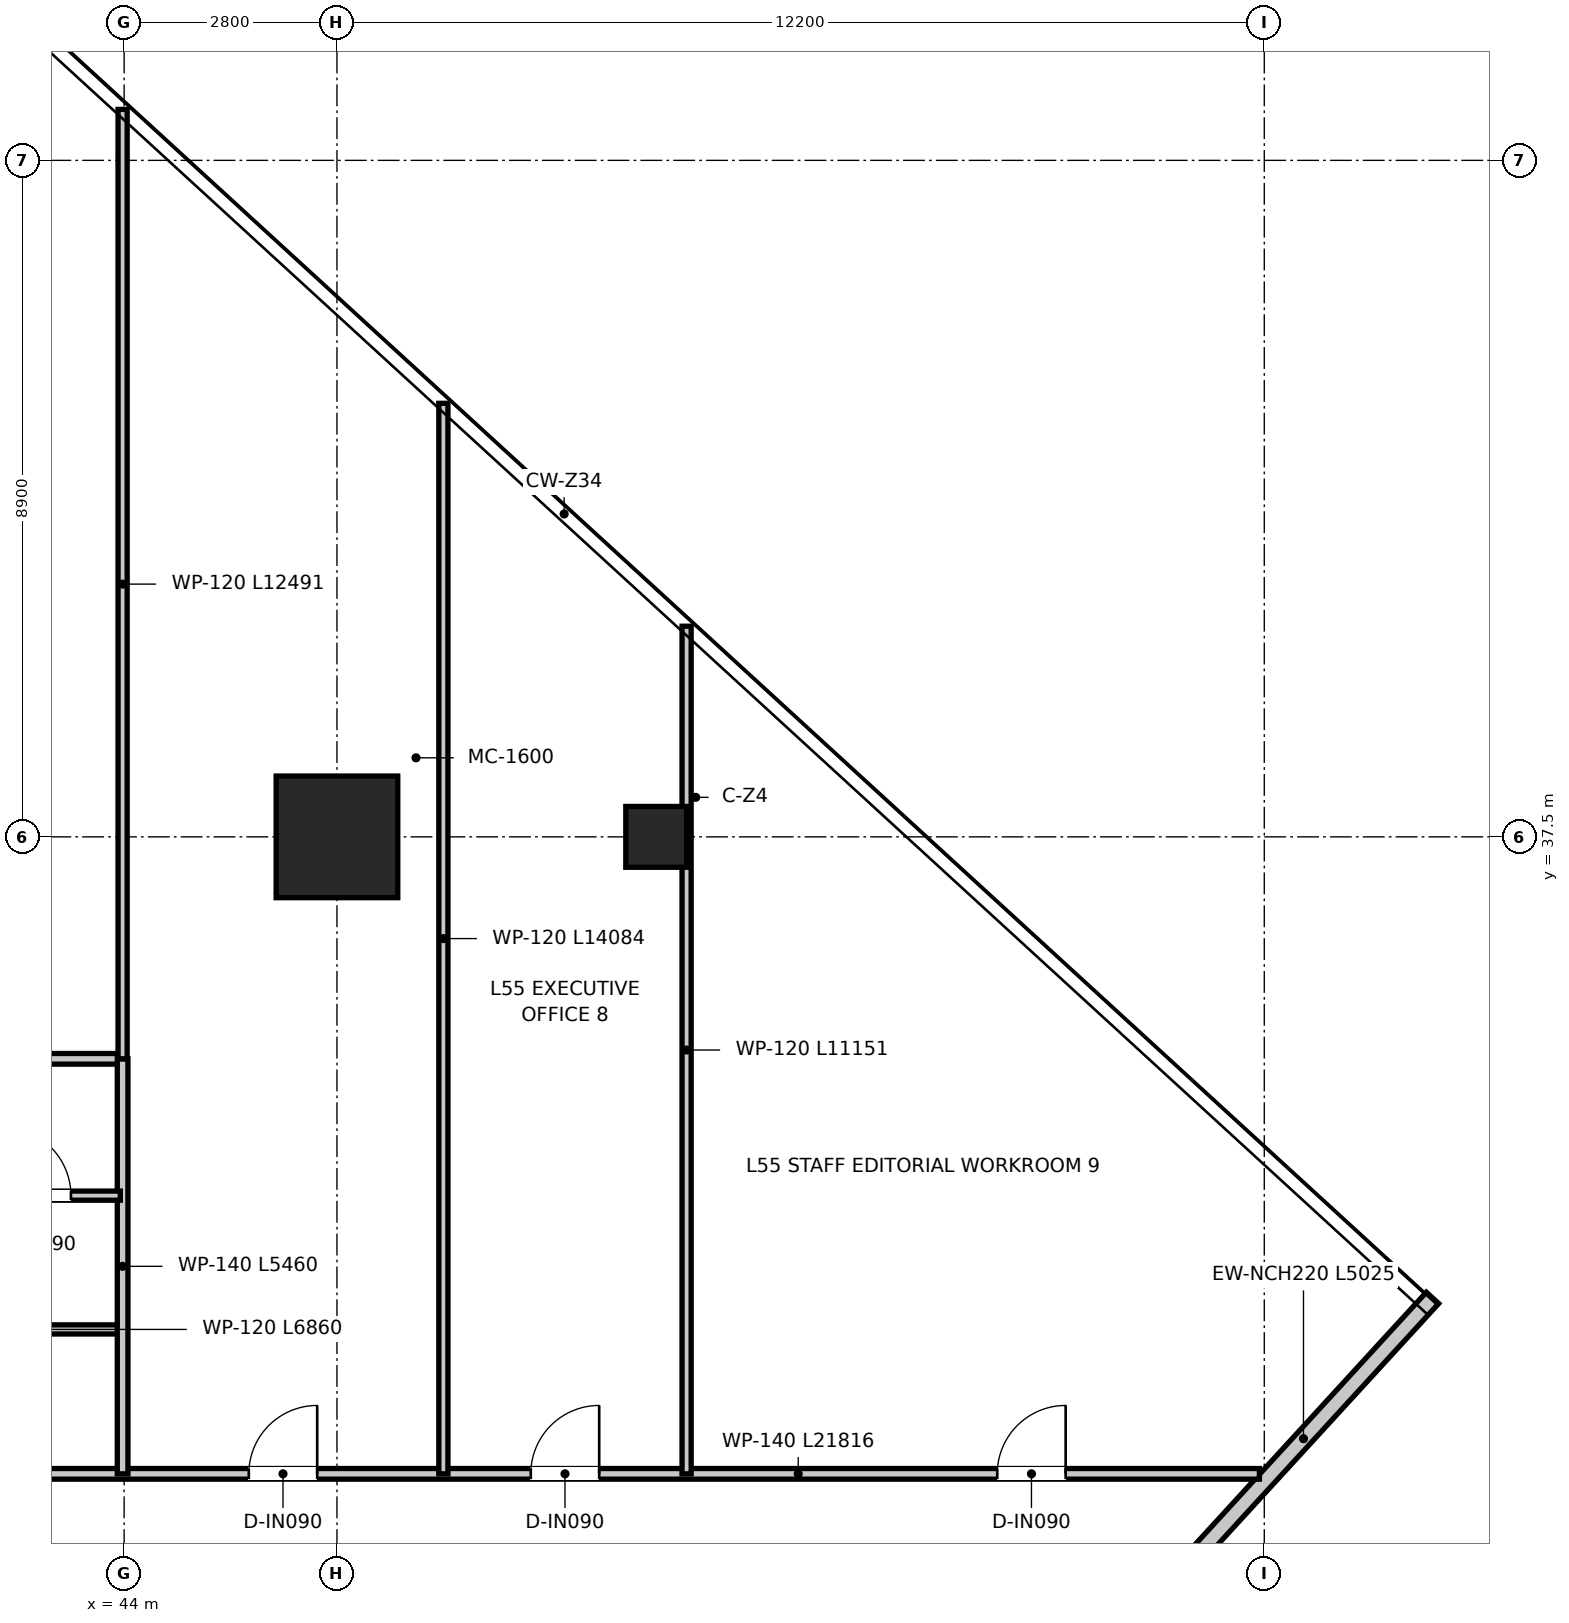
"""IFC4 building model, lengths in metres.
Left out: names, types, materials, properties, quantities, classifications, styles, units other than length and angle.
Written with IfcOpenShell. Run it as: python <this file> out.ifc"""

import sys

from ifc_helpers import new_model, si_unit, direction, frame, frame_2d, origin, origin_2d, place, context, subcontext, project, spatial, rectangle, extrude, source, transform, mapped, element, fill, save


model = new_model("IFC4")
c1 = context("Model", 3, precision=1e-05, world=origin(), true_north=direction((0.0, 1.0)))
c2 = subcontext(c1, "Body", "Model", "MODEL_VIEW")
j1 = project(units=[si_unit("LENGTHUNIT", "METRE"), si_unit("PLANEANGLEUNIT", "RADIAN")], contexts=[c1])
p1 = place(None, origin())
s1 = spatial("IfcSite", under=j1, at=p1, CompositionType="ELEMENT")
p2 = place(p1, origin())
s2 = spatial("IfcBuilding", under=s1, at=p2, CompositionType="ELEMENT")
p3 = place(p2, frame((0.0, 0.0, 227.05)))
s3 = spatial("IfcBuildingStorey", under=s2, at=p3, CompositionType="ELEMENT", Elevation=227.05)
m1 = source(origin(), c2, "Body", "SweptSolid", [
    extrude(rectangle(XDim=1.6, YDim=1.6, at=origin_2d()), origin(), (0.0, 0.0, 1.0), 3.95),
])
p4 = place(p3, frame((46.8, 37.5, 0.0), z_axis=(0.0, 0.0, 1.0), x_axis=(1.0, 0.0, 0.0)))
e1 = element("IfcColumn", 1, at=p4, inside=s3, PredefinedType="USERDEFINED", context=c2, shape_type="MappedRepresentation", body=[
    mapped(m1, transform((0.0, 0.0, 0.0), x_axis=(1.0, 0.0, 0.0), y_axis=(0.0, 1.0, 0.0), z_axis=(0.0, 0.0, 1.0), scale=1.0)),
])
m2 = source(origin(), c2, "Body", "SweptSolid", [
    extrude(rectangle(XDim=0.8, YDim=0.8, at=origin_2d()), origin(), (0.0, 0.0, 1.0), 3.95),
])
p5 = place(p3, frame((51.0, 37.5, 0.0), z_axis=(0.0, 0.0, 1.0), x_axis=(1.0, 0.0, 0.0)))
e2 = element("IfcColumn", 2, at=p5, inside=s3, PredefinedType="COLUMN", context=c2, shape_type="MappedRepresentation", body=[
    mapped(m2, transform((0.0, 0.0, 0.0), x_axis=(1.0, 0.0, 0.0), y_axis=(0.0, 1.0, 0.0), z_axis=(0.0, 0.0, 1.0), scale=1.0)),
])
p6 = place(p3, frame((57.818, 27.73, 0.0), z_axis=(0.0, 0.0, 1.0), x_axis=(0.675581609375, 0.737285215553, 0.0)))
e3 = element("IfcWall", 3, at=p6, inside=s3, PredefinedType="ELEMENTEDWALL", context=c2, shape_type="SweptSolid", body=[
    extrude(rectangle(XDim=5.025, YDim=0.22, at=frame_2d((2.512, 0.0))), origin(), (0.0, 0.0, 1.0), 3.67),
])
p7 = place(p3, frame((37.12, 29.12, 0.0), z_axis=(0.0, 0.0, 1.0), x_axis=(1.0, 0.0, 0.0)))
e4 = element("IfcWall", 4, at=p7, inside=s3, PredefinedType="PARTITIONING", context=c2, shape_type="SweptSolid", body=[
    extrude(rectangle(XDim=21.815, YDim=0.14, at=frame_2d((10.908, 0.0))), origin(), (0.0, 0.0, 1.0), 3.03),
])
p8 = place(p7, frame((3.03, 0.0, 0.0)))
e5 = element("IfcOpeningElement", 5, at=p8, cuts=e4, PredefinedType="OPENING", context=c2, shape_type="SweptSolid", body=[
    extrude(rectangle(XDim=0.9, YDim=2.1, at=frame_2d((0.45, 1.05))), frame((0.0, 0.08, 0.0), z_axis=(0.0, -1.0, 0.0), x_axis=(1.0, 0.0, 0.0)), (0.0, 0.0, 1.0), 0.16),
])
p9 = place(p7, frame((8.52, 0.0, 0.0)))
e6 = element("IfcOpeningElement", 6, at=p9, cuts=e4, PredefinedType="OPENING", context=c2, shape_type="SweptSolid", body=[
    extrude(rectangle(XDim=0.9, YDim=2.1, at=frame_2d((0.45, 1.05))), frame((0.0, 0.08, 0.0), z_axis=(0.0, -1.0, 0.0), x_axis=(1.0, 0.0, 0.0)), (0.0, 0.0, 1.0), 0.16),
])
p10 = place(p7, frame((12.23, 0.0, 0.0)))
e7 = element("IfcOpeningElement", 7, at=p10, cuts=e4, PredefinedType="OPENING", context=c2, shape_type="SweptSolid", body=[
    extrude(rectangle(XDim=0.9, YDim=2.1, at=frame_2d((0.45, 1.05))), frame((0.0, 0.08, 0.0), z_axis=(0.0, -1.0, 0.0), x_axis=(1.0, 0.0, 0.0)), (0.0, 0.0, 1.0), 0.16),
])
p11 = place(p7, frame((18.367, 0.0, 0.0)))
e8 = element("IfcOpeningElement", 8, at=p11, cuts=e4, PredefinedType="OPENING", context=c2, shape_type="SweptSolid", body=[
    extrude(rectangle(XDim=0.9, YDim=2.1, at=frame_2d((0.45, 1.05))), frame((0.0, 0.08, 0.0), z_axis=(0.0, -1.0, 0.0), x_axis=(1.0, 0.0, 0.0)), (0.0, 0.0, 1.0), 0.16),
])
p12 = place(p3, frame((37.12, 31.02, 0.0), z_axis=(0.0, 0.0, 1.0), x_axis=(1.0, 0.0, 0.0)))
e9 = element("IfcWall", 9, at=p12, inside=s3, PredefinedType="PARTITIONING", context=c2, shape_type="SweptSolid", body=[
    extrude(rectangle(XDim=6.86, YDim=0.12, at=frame_2d((3.43, 0.0))), origin(), (0.0, 0.0, 1.0), 3.18),
])
p13 = place(p3, frame((37.12, 34.58, 0.0), z_axis=(0.0, 0.0, 1.0), x_axis=(1.0, 0.0, 0.0)))
e10 = element("IfcWall", 10, at=p13, inside=s3, PredefinedType="PARTITIONING", context=c2, shape_type="SweptSolid", body=[
    extrude(rectangle(XDim=6.86, YDim=0.14, at=frame_2d((3.43, 0.0))), origin(), (0.0, 0.0, 1.0), 3.18),
])
p14 = place(p3, frame((43.98, 29.12, 0.0), z_axis=(0.0, 0.0, 1.0), x_axis=(0.0, 1.0, 0.0)))
e11 = element("IfcWall", 11, at=p14, inside=s3, PredefinedType="PARTITIONING", context=c2, shape_type="SweptSolid", body=[
    extrude(rectangle(XDim=5.46, YDim=0.14, at=frame_2d((2.73, 0.0))), origin(), (0.0, 0.0, 1.0), 3.37),
])
p15 = place(p3, frame((37.15, 32.78, 0.0), z_axis=(0.0, 0.0, 1.0), x_axis=(1.0, 0.0, 0.0)))
e12 = element("IfcWall", 12, at=p15, inside=s3, PredefinedType="PARTITIONING", context=c2, shape_type="SweptSolid", body=[
    extrude(rectangle(XDim=6.8, YDim=0.12, at=frame_2d((3.4, 0.0))), origin(), (0.0, 0.0, 1.0), 3.18),
])
p16 = place(p15, frame((0.725, 0.0, 0.0)))
e13 = element("IfcOpeningElement", 13, at=p16, cuts=e12, PredefinedType="OPENING", context=c2, shape_type="SweptSolid", body=[
    extrude(rectangle(XDim=0.85, YDim=2.1, at=frame_2d((0.425, 1.05))), frame((0.0, 0.07, 0.0), z_axis=(0.0, -1.0, 0.0), x_axis=(1.0, 0.0, 0.0)), (0.0, 0.0, 1.0), 0.14),
])
p17 = place(p15, frame((3.065, 0.0, 0.0)))
e14 = element("IfcOpeningElement", 14, at=p17, cuts=e12, PredefinedType="OPENING", context=c2, shape_type="SweptSolid", body=[
    extrude(rectangle(XDim=0.85, YDim=2.1, at=frame_2d((0.425, 1.05))), frame((0.0, 0.07, 0.0), z_axis=(0.0, -1.0, 0.0), x_axis=(1.0, 0.0, 0.0)), (0.0, 0.0, 1.0), 0.14),
])
p18 = place(p15, frame((5.25, 0.0, 0.0)))
e15 = element("IfcOpeningElement", 15, at=p18, cuts=e12, PredefinedType="OPENING", context=c2, shape_type="SweptSolid", body=[
    extrude(rectangle(XDim=0.9, YDim=2.1, at=frame_2d((0.45, 1.05))), frame((0.0, 0.07, 0.0), z_axis=(0.0, -1.0, 0.0), x_axis=(1.0, 0.0, 0.0)), (0.0, 0.0, 1.0), 0.14),
])
p19 = place(p3, frame((43.98, 34.58, 0.0), z_axis=(0.0, 0.0, 1.0), x_axis=(0.0, 1.0, 0.0)))
e16 = element("IfcWall", 16, at=p19, inside=s3, PredefinedType="PARTITIONING", context=c2, shape_type="SweptSolid", body=[
    extrude(rectangle(XDim=12.49, YDim=0.12, at=frame_2d((6.245, 0.0))), origin(), (0.0, 0.0, 1.0), 3.03),
])
p20 = place(p3, frame((48.2, 29.12, 0.0), z_axis=(0.0, 0.0, 1.0), x_axis=(0.0, 1.0, 0.0)))
e17 = element("IfcWall", 17, at=p20, inside=s3, PredefinedType="PARTITIONING", context=c2, shape_type="SweptSolid", body=[
    extrude(rectangle(XDim=14.083, YDim=0.12, at=frame_2d((7.042, 0.0))), origin(), (0.0, 0.0, 1.0), 3.18),
])
p21 = place(p3, frame((51.4, 29.12, 0.0), z_axis=(0.0, 0.0, 1.0), x_axis=(0.0, 1.0, 0.0)))
e18 = element("IfcWall", 18, at=p21, inside=s3, PredefinedType="PARTITIONING", context=c2, shape_type="SweptSolid", body=[
    extrude(rectangle(XDim=11.151, YDim=0.12, at=frame_2d((5.576, 0.0))), origin(), (0.0, 0.0, 1.0), 3.67),
])
p22 = place(p18, origin())
e19 = element("IfcDoor", 19, at=p22, inside=s3, OperationType="SINGLE_SWING_LEFT", PredefinedType="DOOR", context=c2, shape_type="SweptSolid", body=[
    extrude(rectangle(XDim=0.9, YDim=2.1, at=frame_2d((0.45, 1.05))), frame((0.0, 0.025, 0.0), z_axis=(0.0, -1.0, 0.0), x_axis=(1.0, 0.0, 0.0)), (0.0, 0.0, 1.0), 0.05),
])
fill(e15, e19)
p23 = place(p9, origin())
e20 = element("IfcDoor", 20, at=p23, inside=s3, OperationType="SINGLE_SWING_RIGHT", PredefinedType="DOOR", context=c2, shape_type="SweptSolid", body=[
    extrude(rectangle(XDim=0.9, YDim=2.1, at=frame_2d((0.45, 1.05))), frame((0.0, 0.025, 0.0), z_axis=(0.0, -1.0, 0.0), x_axis=(1.0, 0.0, 0.0)), (0.0, 0.0, 1.0), 0.05),
])
fill(e6, e20)
p24 = place(p10, origin())
e21 = element("IfcDoor", 21, at=p24, inside=s3, OperationType="SINGLE_SWING_RIGHT", PredefinedType="DOOR", context=c2, shape_type="SweptSolid", body=[
    extrude(rectangle(XDim=0.9, YDim=2.1, at=frame_2d((0.45, 1.05))), frame((0.0, 0.025, 0.0), z_axis=(0.0, -1.0, 0.0), x_axis=(1.0, 0.0, 0.0)), (0.0, 0.0, 1.0), 0.05),
])
fill(e7, e21)
p25 = place(p11, origin())
e22 = element("IfcDoor", 22, at=p25, inside=s3, OperationType="SINGLE_SWING_RIGHT", PredefinedType="DOOR", context=c2, shape_type="SweptSolid", body=[
    extrude(rectangle(XDim=0.9, YDim=2.1, at=frame_2d((0.45, 1.05))), frame((0.0, 0.025, 0.0), z_axis=(0.0, -1.0, 0.0), x_axis=(1.0, 0.0, 0.0)), (0.0, 0.0, 1.0), 0.05),
])
fill(e8, e22)
save(model, sys.argv[1])
